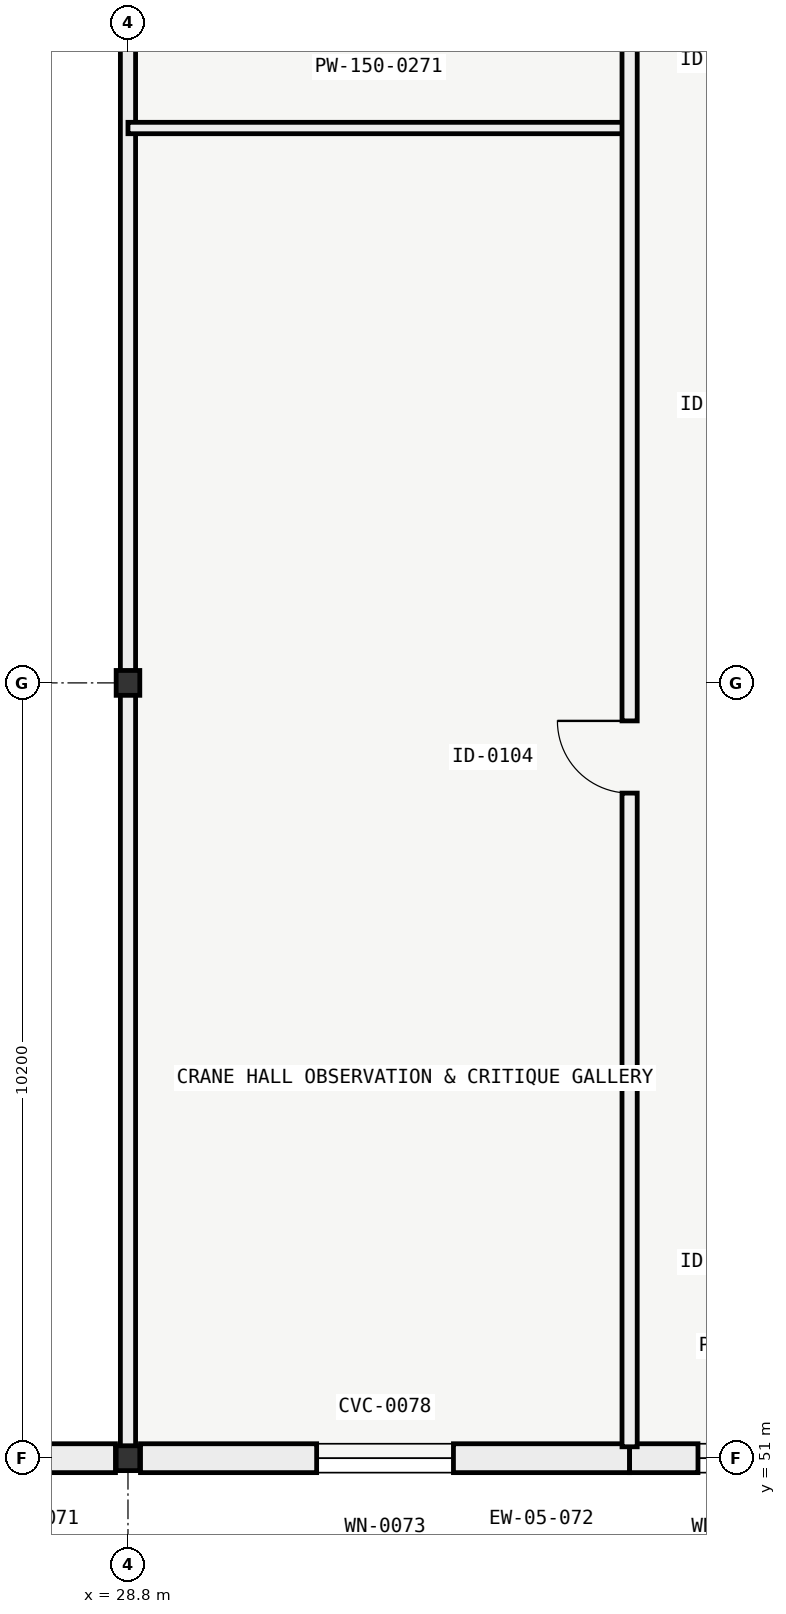
"""IFC4 building model, lengths in metres.
Left out: names, types, materials, properties, quantities, classifications, styles, units other than length and angle.
Written with IfcOpenShell. Run it as: python <this file> out.ifc"""

import sys

from ifc_helpers import new_model, si_unit, direction, frame, frame_2d, origin, origin_2d, place, context, subcontext, project, spatial, rectangle, i_section, extrude, element, fill, save


model = new_model("IFC4")
c1 = context("Model", 3, precision=1e-05, world=origin(), true_north=direction((0.0, 1.0)))
c2 = subcontext(c1, "Body", "Model", "MODEL_VIEW")
j1 = project(units=[si_unit("LENGTHUNIT", "METRE"), si_unit("PLANEANGLEUNIT", "RADIAN")], contexts=[c1])
p1 = place(None, origin())
s1 = spatial("IfcSite", under=j1, at=p1, CompositionType="ELEMENT")
p2 = place(p1, origin())
s2 = spatial("IfcBuilding", under=s1, at=p2, CompositionType="ELEMENT")
p3 = place(p2, frame((0.0, 0.0, 5.4)))
s3 = spatial("IfcBuildingStorey", under=s2, at=p3, CompositionType="ELEMENT", Elevation=5.4)
for number, where, z_axis, x_axis in (
    (1, (28.8, 51.0, 0.0), (0.0, 0.0, 1.0), (1.0, 0.0, 0.0)),
    (2, (28.8, 61.2, 0.0), (0.0, 0.0, 1.0), (1.0, 0.0, 0.0)),
):
    element("IfcColumn", number, at=place(p3, frame(where, z_axis=z_axis, x_axis=x_axis)), inside=s3, PredefinedType="COLUMN", context=c2, shape_type="SweptSolid", body=[
        extrude(i_section(OverallWidth=0.311, OverallDepth=0.327, WebThickness=0.016, FlangeThickness=0.025, FilletRadius=0.017, at=origin_2d()), origin(), (0.0, 0.0, 1.0), 4.2),
    ])
p4 = place(p3, frame((28.635, 51.0, 0.0), z_axis=(0.0, 0.0, 1.0), x_axis=(-1.0, 0.0, 0.0)))
e3 = element("IfcWall", 3, at=p4, inside=s3, PredefinedType="SOLIDWALL", context=c2, shape_type="SweptSolid", body=[
    extrude(rectangle(XDim=9.436, YDim=0.38, at=frame_2d((4.718, 0.0))), origin(), (0.0, 0.0, 1.0), 3.1),
])
p5 = place(p4, frame((5.835, 0.0, 0.85)))
e4 = element("IfcOpeningElement", 4, at=p5, cuts=e3, PredefinedType="OPENING", context=c2, shape_type="SweptSolid", body=[
    extrude(rectangle(XDim=2.0, YDim=1.35, at=frame_2d((1.0, 0.675))), frame((0.0, 0.2, 0.0), z_axis=(0.0, -1.0, 0.0), x_axis=(1.0, 0.0, 0.0)), (0.0, 0.0, 1.0), 0.4),
])
p6 = place(p4, frame((2.335, 0.0, 0.85)))
e5 = element("IfcOpeningElement", 5, at=p6, cuts=e3, PredefinedType="OPENING", context=c2, shape_type="SweptSolid", body=[
    extrude(rectangle(XDim=2.0, YDim=1.35, at=frame_2d((1.0, 0.675))), frame((0.0, 0.2, 0.0), z_axis=(0.0, -1.0, 0.0), x_axis=(1.0, 0.0, 0.0)), (0.0, 0.0, 1.0), 0.4),
])
p7 = place(p3, frame((35.4, 51.0, 0.0), z_axis=(0.0, 0.0, 1.0), x_axis=(-1.0, 0.0, 0.0)))
e6 = element("IfcWall", 6, at=p7, inside=s3, PredefinedType="SOLIDWALL", context=c2, shape_type="SweptSolid", body=[
    extrude(rectangle(XDim=6.435, YDim=0.38, at=frame_2d((3.218, 0.0))), origin(), (0.0, 0.0, 1.0), 3.298),
])
p8 = place(p7, frame((2.318, 0.0, 0.9)))
e7 = element("IfcOpeningElement", 7, at=p8, cuts=e6, PredefinedType="OPENING", context=c2, shape_type="SweptSolid", body=[
    extrude(rectangle(XDim=1.8, YDim=2.1, at=frame_2d((0.9, 1.05))), frame((0.0, 0.2, 0.0), z_axis=(0.0, -1.0, 0.0), x_axis=(1.0, 0.0, 0.0)), (0.0, 0.0, 1.0), 0.4),
])
p9 = place(p3, frame((38.099, 51.0, 0.0), z_axis=(0.0, 0.0, 1.0), x_axis=(-1.0, 0.0, 0.0)))
e8 = element("IfcWall", 8, at=p9, inside=s3, PredefinedType="SOLIDWALL", context=c2, shape_type="SweptSolid", body=[
    extrude(rectangle(XDim=2.699, YDim=0.38, at=frame_2d((1.35, 0.0))), origin(), (0.0, 0.0, 1.0), 3.298),
])
p10 = place(p9, frame((0.899, 0.0, 0.85)))
e9 = element("IfcOpeningElement", 9, at=p10, cuts=e8, PredefinedType="OPENING", context=c2, shape_type="SweptSolid", body=[
    extrude(rectangle(XDim=0.9, YDim=2.2, at=frame_2d((0.45, 1.1))), frame((0.0, 0.2, 0.0), z_axis=(0.0, -1.0, 0.0), x_axis=(1.0, 0.0, 0.0)), (0.0, 0.0, 1.0), 0.4),
])
p11 = place(p3, frame((28.8, 51.15, 0.0), z_axis=(0.0, 0.0, 1.0), x_axis=(0.0, 1.0, 0.0)))
e10 = element("IfcWall", 10, at=p11, inside=s3, PredefinedType="PARTITIONING", context=c2, shape_type="SweptSolid", body=[
    extrude(rectangle(XDim=71.1, YDim=0.2, at=frame_2d((35.55, 0.0))), origin(), (0.0, 0.0, 1.0), 3.0),
])
p12 = place(p3, frame((28.8, 68.5, 0.0), z_axis=(0.0, 0.0, 1.0), x_axis=(1.0, 0.0, 0.0)))
e11 = element("IfcWall", 11, at=p12, inside=s3, PredefinedType="PARTITIONING", context=c2, shape_type="SweptSolid", body=[
    extrude(rectangle(XDim=6.6, YDim=0.15, at=frame_2d((3.3, 0.0))), origin(), (0.0, 0.0, 1.0), 3.443),
])
p13 = place(p3, frame((35.4, 51.15, 0.0), z_axis=(0.0, 0.0, 1.0), x_axis=(0.0, 1.0, 0.0)))
e12 = element("IfcWall", 12, at=p13, inside=s3, PredefinedType="PARTITIONING", context=c2, shape_type="SweptSolid", body=[
    extrude(rectangle(XDim=71.1, YDim=0.2, at=frame_2d((35.55, 0.0))), origin(), (0.0, 0.0, 1.0), 3.298),
])
p14 = place(p13, frame((8.6, 0.0, 0.0)))
e13 = element("IfcOpeningElement", 13, at=p14, cuts=e12, PredefinedType="OPENING", context=c2, shape_type="SweptSolid", body=[
    extrude(rectangle(XDim=0.95, YDim=2.1, at=frame_2d((0.475, 1.05))), frame((0.0, 0.11, 0.0), z_axis=(0.0, -1.0, 0.0), x_axis=(1.0, 0.0, 0.0)), (0.0, 0.0, 1.0), 0.22),
])
p15 = place(p13, frame((26.45, 0.0, 0.0)))
e14 = element("IfcOpeningElement", 14, at=p15, cuts=e12, PredefinedType="OPENING", context=c2, shape_type="SweptSolid", body=[
    extrude(rectangle(XDim=1.4, YDim=2.2, at=frame_2d((0.7, 1.1))), frame((0.0, 0.11, 0.0), z_axis=(0.0, -1.0, 0.0), x_axis=(1.0, 0.0, 0.0)), (0.0, 0.0, 1.0), 0.22),
])
p16 = place(p13, frame((44.45, 0.0, 0.0)))
e15 = element("IfcOpeningElement", 15, at=p16, cuts=e12, PredefinedType="OPENING", context=c2, shape_type="SweptSolid", body=[
    extrude(rectangle(XDim=0.95, YDim=2.1, at=frame_2d((0.475, 1.05))), frame((0.0, 0.11, 0.0), z_axis=(0.0, -1.0, 0.0), x_axis=(1.0, 0.0, 0.0)), (0.0, 0.0, 1.0), 0.22),
])
p17 = place(p13, frame((62.3, 0.0, 0.0)))
e16 = element("IfcOpeningElement", 16, at=p17, cuts=e12, PredefinedType="OPENING", context=c2, shape_type="SweptSolid", body=[
    extrude(rectangle(XDim=1.4, YDim=2.2, at=frame_2d((0.7, 1.1))), frame((0.0, 0.11, 0.0), z_axis=(0.0, -1.0, 0.0), x_axis=(1.0, 0.0, 0.0)), (0.0, 0.0, 1.0), 0.22),
])
p18 = place(p8, origin())
e17 = element("IfcWindow", 17, at=p18, inside=s3, PartitioningType="SINGLE_PANEL", PredefinedType="WINDOW", context=c2, shape_type="SweptSolid", body=[
    extrude(rectangle(XDim=1.8, YDim=2.1, at=frame_2d((0.9, 1.05))), frame((0.0, 0.03, 0.0), z_axis=(0.0, -1.0, 0.0), x_axis=(1.0, 0.0, 0.0)), (0.0, 0.0, 1.0), 0.06),
])
fill(e7, e17)
p19 = place(p10, origin())
e18 = element("IfcWindow", 18, at=p19, inside=s3, PartitioningType="SINGLE_PANEL", PredefinedType="WINDOW", context=c2, shape_type="SweptSolid", body=[
    extrude(rectangle(XDim=0.9, YDim=2.2, at=frame_2d((0.45, 1.1))), frame((0.0, 0.03, 0.0), z_axis=(0.0, -1.0, 0.0), x_axis=(1.0, 0.0, 0.0)), (0.0, 0.0, 1.0), 0.06),
])
fill(e9, e18)
p20 = place(p14, origin())
e19 = element("IfcDoor", 19, at=p20, inside=s3, OperationType="SINGLE_SWING_RIGHT", PredefinedType="DOOR", context=c2, shape_type="SweptSolid", body=[
    extrude(rectangle(XDim=0.95, YDim=2.1, at=frame_2d((0.475, 1.05))), frame((0.0, 0.025, 0.0), z_axis=(0.0, -1.0, 0.0), x_axis=(1.0, 0.0, 0.0)), (0.0, 0.0, 1.0), 0.05),
])
fill(e13, e19)
save(model, sys.argv[1])
